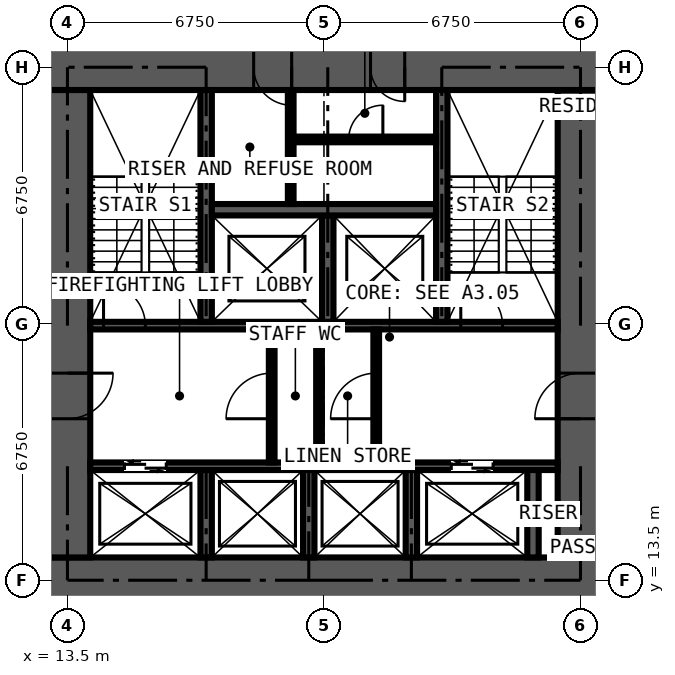
"""IFC4 building model, lengths in metres.
Left out: names, types, materials, properties, quantities, classifications, styles, units other than length and angle.
Written with IfcOpenShell. Run it as: python <this file> out.ifc"""

import sys

from ifc_helpers import new_model, si_unit, direction, frame, frame_2d, origin, place, context, subcontext, project, spatial, rectangle, extrude, element, fill, save


model = new_model("IFC4")
c1 = context("Model", 3, precision=1e-05, world=origin(), true_north=direction((0.0, 1.0)))
c2 = subcontext(c1, "Body", "Model", "MODEL_VIEW")
j1 = project(units=[si_unit("LENGTHUNIT", "METRE"), si_unit("PLANEANGLEUNIT", "RADIAN")], contexts=[c1])
p1 = place(None, origin())
s1 = spatial("IfcSite", under=j1, at=p1, CompositionType="ELEMENT")
p2 = place(p1, origin())
s2 = spatial("IfcBuilding", under=s1, at=p2, CompositionType="ELEMENT")
p3 = place(p2, frame((0.0, 0.0, 101.7)))
s3 = spatial("IfcBuildingStorey", under=s2, at=p3, CompositionType="ELEMENT", Elevation=101.7)
p4 = place(p3, frame((12.9, 13.5, 0.0), z_axis=(0.0, 0.0, 1.0), x_axis=(1.0, 0.0, 0.0)))
e1 = element("IfcWall", 1, at=p4, inside=s3, PredefinedType="SHEAR", context=c2, shape_type="SweptSolid", body=[
    extrude(rectangle(XDim=14.7, YDim=1.2, at=frame_2d((7.35, 0.0))), origin(), (0.0, 0.0, 1.0), 3.6),
])
p5 = place(p3, frame((27.0, 14.1, 0.0), z_axis=(0.0, 0.0, 1.0), x_axis=(0.0, 1.0, 0.0)))
e2 = element("IfcWall", 2, at=p5, inside=s3, PredefinedType="SHEAR", context=c2, shape_type="SweptSolid", body=[
    extrude(rectangle(XDim=12.3, YDim=1.2, at=frame_2d((6.15, 0.0))), origin(), (0.0, 0.0, 1.0), 3.6),
])
p6 = place(p5, frame((3.65, 0.0, 0.0)))
e3 = element("IfcOpeningElement", 3, at=p6, cuts=e2, PredefinedType="OPENING", context=c2, shape_type="SweptSolid", body=[
    extrude(rectangle(XDim=1.2, YDim=2.2, at=frame_2d((0.6, 1.1))), frame((0.0, 0.61, 0.0), z_axis=(0.0, -1.0, 0.0), x_axis=(1.0, 0.0, 0.0)), (0.0, 0.0, 1.0), 1.22),
])
p7 = place(p3, frame((27.6, 27.0, 0.0), z_axis=(0.0, 0.0, 1.0), x_axis=(-1.0, 0.0, 0.0)))
e4 = element("IfcWall", 4, at=p7, inside=s3, PredefinedType="SHEAR", context=c2, shape_type="SweptSolid", body=[
    extrude(rectangle(XDim=14.7, YDim=1.2, at=frame_2d((7.35, 0.0))), origin(), (0.0, 0.0, 1.0), 3.6),
])
p8 = place(p7, frame((5.225, 0.0, 0.0)))
e5 = element("IfcOpeningElement", 5, at=p8, cuts=e4, PredefinedType="OPENING", context=c2, shape_type="SweptSolid", body=[
    extrude(rectangle(XDim=0.9, YDim=2.2, at=frame_2d((0.45, 1.1))), frame((0.0, 0.61, 0.0), z_axis=(0.0, -1.0, 0.0), x_axis=(1.0, 0.0, 0.0)), (0.0, 0.0, 1.0), 1.22),
])
p9 = place(p7, frame((8.2, 0.0, 0.0)))
e6 = element("IfcOpeningElement", 6, at=p9, cuts=e4, PredefinedType="OPENING", context=c2, shape_type="SweptSolid", body=[
    extrude(rectangle(XDim=1.0, YDim=2.2, at=frame_2d((0.5, 1.1))), frame((0.0, 0.61, 0.0), z_axis=(0.0, -1.0, 0.0), x_axis=(1.0, 0.0, 0.0)), (0.0, 0.0, 1.0), 1.22),
])
p10 = place(p3, frame((13.5, 26.4, 0.0), z_axis=(0.0, 0.0, 1.0), x_axis=(0.0, -1.0, 0.0)))
e7 = element("IfcWall", 7, at=p10, inside=s3, PredefinedType="SHEAR", context=c2, shape_type="SweptSolid", body=[
    extrude(rectangle(XDim=12.3, YDim=1.2, at=frame_2d((6.15, 0.0))), origin(), (0.0, 0.0, 1.0), 3.6),
])
p11 = place(p10, frame((7.45, 0.0, 0.0)))
e8 = element("IfcOpeningElement", 8, at=p11, cuts=e7, PredefinedType="OPENING", context=c2, shape_type="SweptSolid", body=[
    extrude(rectangle(XDim=1.2, YDim=2.2, at=frame_2d((0.6, 1.1))), frame((0.0, 0.61, 0.0), z_axis=(0.0, -1.0, 0.0), x_axis=(1.0, 0.0, 0.0)), (0.0, 0.0, 1.0), 1.22),
])
p12 = place(p3, frame((14.1, 16.5, 0.0), z_axis=(0.0, 0.0, 1.0), x_axis=(1.0, 0.0, 0.0)))
e9 = element("IfcWall", 9, at=p12, inside=s3, PredefinedType="SHEAR", context=c2, shape_type="SweptSolid", body=[
    extrude(rectangle(XDim=12.3, YDim=0.2, at=frame_2d((6.15, 0.0))), origin(), (0.0, 0.0, 1.0), 3.6),
])
p13 = place(p12, frame((0.9, 0.0, 0.0)))
e10 = element("IfcOpeningElement", 10, at=p13, cuts=e9, PredefinedType="OPENING", context=c2, shape_type="SweptSolid", body=[
    extrude(rectangle(XDim=1.1, YDim=2.2, at=frame_2d((0.55, 1.1))), frame((0.0, 0.11, 0.0), z_axis=(0.0, -1.0, 0.0), x_axis=(1.0, 0.0, 0.0)), (0.0, 0.0, 1.0), 0.22),
])
p14 = place(p12, frame((9.5, 0.0, 0.0)))
e11 = element("IfcOpeningElement", 11, at=p14, cuts=e9, PredefinedType="OPENING", context=c2, shape_type="SweptSolid", body=[
    extrude(rectangle(XDim=1.1, YDim=2.2, at=frame_2d((0.55, 1.1))), frame((0.0, 0.11, 0.0), z_axis=(0.0, -1.0, 0.0), x_axis=(1.0, 0.0, 0.0)), (0.0, 0.0, 1.0), 0.22),
])
p15 = place(p3, frame((14.1, 20.2, 0.0), z_axis=(0.0, 0.0, 1.0), x_axis=(1.0, 0.0, 0.0)))
e12 = element("IfcWall", 12, at=p15, inside=s3, PredefinedType="SHEAR", context=c2, shape_type="SweptSolid", body=[
    extrude(rectangle(XDim=12.3, YDim=0.2, at=frame_2d((6.15, 0.0))), origin(), (0.0, 0.0, 1.0), 3.6),
])
p16 = place(p15, frame((0.35, 0.0, 0.0)))
e13 = element("IfcOpeningElement", 13, at=p16, cuts=e12, PredefinedType="OPENING", context=c2, shape_type="SweptSolid", body=[
    extrude(rectangle(XDim=1.1, YDim=2.2, at=frame_2d((0.55, 1.1))), frame((0.0, 0.11, 0.0), z_axis=(0.0, -1.0, 0.0), x_axis=(1.0, 0.0, 0.0)), (0.0, 0.0, 1.0), 0.22),
])
p17 = place(p15, frame((9.75, 0.0, 0.0)))
e14 = element("IfcOpeningElement", 14, at=p17, cuts=e12, PredefinedType="OPENING", context=c2, shape_type="SweptSolid", body=[
    extrude(rectangle(XDim=1.1, YDim=2.2, at=frame_2d((0.55, 1.1))), frame((0.0, 0.11, 0.0), z_axis=(0.0, -1.0, 0.0), x_axis=(1.0, 0.0, 0.0)), (0.0, 0.0, 1.0), 0.22),
])
for number, where, z_axis, x_axis in (
    (15, (17.15, 20.3, 0.0), (0.0, 0.0, 1.0), (0.0, 1.0, 0.0)),
    (16, (23.35, 20.3, 0.0), (0.0, 0.0, 1.0), (0.0, 1.0, 0.0)),
):
    element("IfcWall", number, at=place(p3, frame(where, z_axis=z_axis, x_axis=x_axis)), inside=s3, PredefinedType="SHEAR", context=c2, shape_type="SweptSolid", body=[
        extrude(rectangle(XDim=6.1, YDim=0.3, at=frame_2d((3.05, 0.0))), origin(), (0.0, 0.0, 1.0), 3.6),
    ])
p18 = place(p3, frame((20.35, 20.3, 0.0), z_axis=(0.0, 0.0, 1.0), x_axis=(0.0, 1.0, 0.0)))
e17 = element("IfcWall", 17, at=p18, inside=s3, PredefinedType="SHEAR", context=c2, shape_type="SweptSolid", body=[
    extrude(rectangle(XDim=2.8, YDim=0.3, at=frame_2d((1.4, 0.0))), origin(), (0.0, 0.0, 1.0), 3.6),
])
p19 = place(p3, frame((17.3, 23.25, 0.0), z_axis=(0.0, 0.0, 1.0), x_axis=(1.0, 0.0, 0.0)))
e18 = element("IfcWall", 18, at=p19, inside=s3, PredefinedType="SHEAR", context=c2, shape_type="SweptSolid", body=[
    extrude(rectangle(XDim=5.9, YDim=0.3, at=frame_2d((2.95, 0.0))), origin(), (0.0, 0.0, 1.0), 3.6),
])
for number, where, z_axis, x_axis in (
    (19, (17.15, 14.1, 0.0), (0.0, 0.0, 1.0), (0.0, 1.0, 0.0)),
    (20, (19.85, 14.1, 0.0), (0.0, 0.0, 1.0), (0.0, 1.0, 0.0)),
    (21, (22.55, 14.1, 0.0), (0.0, 0.0, 1.0), (0.0, 1.0, 0.0)),
    (22, (25.75, 14.1, 0.0), (0.0, 0.0, 1.0), (0.0, 1.0, 0.0)),
):
    element("IfcWall", number, at=place(p3, frame(where, z_axis=z_axis, x_axis=x_axis)), inside=s3, PredefinedType="SHEAR", context=c2, shape_type="SweptSolid", body=[
        extrude(rectangle(XDim=2.3, YDim=0.3, at=frame_2d((1.15, 0.0))), origin(), (0.0, 0.0, 1.0), 3.6),
    ])
p20 = place(p3, frame((18.875, 16.6, 0.0), z_axis=(0.0, 0.0, 1.0), x_axis=(0.0, 1.0, 0.0)))
e23 = element("IfcWall", 23, at=p20, inside=s3, PredefinedType="PARTITIONING", context=c2, shape_type="SweptSolid", body=[
    extrude(rectangle(XDim=3.5, YDim=0.15, at=frame_2d((1.75, 0.0))), origin(), (0.0, 0.0, 1.0), 3.375),
])
p21 = place(p20, frame((1.15, 0.0, 0.0)))
e24 = element("IfcOpeningElement", 24, at=p21, cuts=e23, PredefinedType="OPENING", context=c2, shape_type="SweptSolid", body=[
    extrude(rectangle(XDim=1.2, YDim=2.2, at=frame_2d((0.6, 1.1))), frame((0.0, 0.085, 0.0), z_axis=(0.0, -1.0, 0.0), x_axis=(1.0, 0.0, 0.0)), (0.0, 0.0, 1.0), 0.17),
])
p22 = place(p3, frame((21.625, 16.6, 0.0), z_axis=(0.0, 0.0, 1.0), x_axis=(0.0, 1.0, 0.0)))
e25 = element("IfcWall", 25, at=p22, inside=s3, PredefinedType="PARTITIONING", context=c2, shape_type="SweptSolid", body=[
    extrude(rectangle(XDim=3.5, YDim=0.15, at=frame_2d((1.75, 0.0))), origin(), (0.0, 0.0, 1.0), 3.375),
])
p23 = place(p22, frame((1.15, 0.0, 0.0)))
e26 = element("IfcOpeningElement", 26, at=p23, cuts=e25, PredefinedType="OPENING", context=c2, shape_type="SweptSolid", body=[
    extrude(rectangle(XDim=1.2, YDim=2.2, at=frame_2d((0.6, 1.1))), frame((0.0, 0.085, 0.0), z_axis=(0.0, -1.0, 0.0), x_axis=(1.0, 0.0, 0.0)), (0.0, 0.0, 1.0), 0.17),
])
p24 = place(p3, frame((20.12, 16.6, 0.0), z_axis=(0.0, 0.0, 1.0), x_axis=(0.0, 1.0, 0.0)))
e27 = element("IfcWall", 27, at=p24, inside=s3, PredefinedType="PARTITIONING", context=c2, shape_type="SweptSolid", body=[
    extrude(rectangle(XDim=3.5, YDim=0.15, at=frame_2d((1.75, 0.0))), origin(), (0.0, 0.0, 1.0), 3.375),
])
p25 = place(p3, frame((19.375, 23.4, 0.0), z_axis=(0.0, 0.0, 1.0), x_axis=(0.0, 1.0, 0.0)))
e28 = element("IfcWall", 28, at=p25, inside=s3, PredefinedType="PARTITIONING", context=c2, shape_type="SweptSolid", body=[
    extrude(rectangle(XDim=3.0, YDim=0.15, at=frame_2d((1.5, 0.0))), origin(), (0.0, 0.0, 1.0), 3.375),
])
p26 = place(p3, frame((19.45, 25.1, 0.0), z_axis=(0.0, 0.0, 1.0), x_axis=(1.0, 0.0, 0.0)))
e29 = element("IfcWall", 29, at=p26, inside=s3, PredefinedType="PARTITIONING", context=c2, shape_type="SweptSolid", body=[
    extrude(rectangle(XDim=3.75, YDim=0.15, at=frame_2d((1.875, 0.0))), origin(), (0.0, 0.0, 1.0), 3.375),
])
p27 = place(p26, frame((1.45, 0.0, 0.0)))
e30 = element("IfcOpeningElement", 30, at=p27, cuts=e29, PredefinedType="OPENING", context=c2, shape_type="SweptSolid", body=[
    extrude(rectangle(XDim=0.9, YDim=2.2, at=frame_2d((0.45, 1.1))), frame((0.0, 0.085, 0.0), z_axis=(0.0, -1.0, 0.0), x_axis=(1.0, 0.0, 0.0)), (0.0, 0.0, 1.0), 0.17),
])
p28 = place(p13, origin())
e31 = element("IfcDoor", 31, at=p28, inside=s3, OperationType="DOUBLE_DOOR_SLIDING", PredefinedType="DOOR", context=c2, shape_type="SweptSolid", body=[
    extrude(rectangle(XDim=1.1, YDim=2.2, at=frame_2d((0.55, 1.1))), frame((0.0, 0.025, 0.0), z_axis=(0.0, -1.0, 0.0), x_axis=(1.0, 0.0, 0.0)), (0.0, 0.0, 1.0), 0.05),
])
fill(e10, e31)
p29 = place(p14, origin())
e32 = element("IfcDoor", 32, at=p29, inside=s3, OperationType="DOUBLE_DOOR_SLIDING", PredefinedType="DOOR", context=c2, shape_type="SweptSolid", body=[
    extrude(rectangle(XDim=1.1, YDim=2.2, at=frame_2d((0.55, 1.1))), frame((0.0, 0.025, 0.0), z_axis=(0.0, -1.0, 0.0), x_axis=(1.0, 0.0, 0.0)), (0.0, 0.0, 1.0), 0.05),
])
fill(e11, e32)
p30 = place(p11, origin())
e33 = element("IfcDoor", 33, at=p30, inside=s3, OperationType="DOUBLE_DOOR_SINGLE_SWING", PredefinedType="DOOR", context=c2, shape_type="SweptSolid", body=[
    extrude(rectangle(XDim=1.2, YDim=2.2, at=frame_2d((0.6, 1.1))), frame((0.0, 0.025, 0.0), z_axis=(0.0, -1.0, 0.0), x_axis=(1.0, 0.0, 0.0)), (0.0, 0.0, 1.0), 0.05),
])
fill(e8, e33)
p31 = place(p6, origin())
e34 = element("IfcDoor", 34, at=p31, inside=s3, OperationType="DOUBLE_DOOR_SINGLE_SWING", PredefinedType="DOOR", context=c2, shape_type="SweptSolid", body=[
    extrude(rectangle(XDim=1.2, YDim=2.2, at=frame_2d((0.6, 1.1))), frame((0.0, 0.025, 0.0), z_axis=(0.0, -1.0, 0.0), x_axis=(1.0, 0.0, 0.0)), (0.0, 0.0, 1.0), 0.05),
])
fill(e3, e34)
p32 = place(p21, origin())
e35 = element("IfcDoor", 35, at=p32, inside=s3, OperationType="DOUBLE_DOOR_SINGLE_SWING", PredefinedType="DOOR", context=c2, shape_type="SweptSolid", body=[
    extrude(rectangle(XDim=1.2, YDim=2.2, at=frame_2d((0.6, 1.1))), frame((0.0, 0.025, 0.0), z_axis=(0.0, -1.0, 0.0), x_axis=(1.0, 0.0, 0.0)), (0.0, 0.0, 1.0), 0.05),
])
fill(e24, e35)
p33 = place(p23, origin())
e36 = element("IfcDoor", 36, at=p33, inside=s3, OperationType="DOUBLE_DOOR_SINGLE_SWING", PredefinedType="DOOR", context=c2, shape_type="SweptSolid", body=[
    extrude(rectangle(XDim=1.2, YDim=2.2, at=frame_2d((0.6, 1.1))), frame((0.0, 0.025, 0.0), z_axis=(0.0, -1.0, 0.0), x_axis=(1.0, 0.0, 0.0)), (0.0, 0.0, 1.0), 0.05),
])
fill(e26, e36)
p34 = place(p27, origin())
e37 = element("IfcDoor", 37, at=p34, inside=s3, OperationType="SINGLE_SWING_RIGHT", PredefinedType="DOOR", context=c2, shape_type="SweptSolid", body=[
    extrude(rectangle(XDim=0.9, YDim=2.2, at=frame_2d((0.45, 1.1))), frame((0.0, 0.025, 0.0), z_axis=(0.0, -1.0, 0.0), x_axis=(1.0, 0.0, 0.0)), (0.0, 0.0, 1.0), 0.05),
])
fill(e30, e37)
p35 = place(p8, origin())
e38 = element("IfcDoor", 38, at=p35, inside=s3, OperationType="SINGLE_SWING_LEFT", PredefinedType="DOOR", context=c2, shape_type="SweptSolid", body=[
    extrude(rectangle(XDim=0.9, YDim=2.2, at=frame_2d((0.45, 1.1))), frame((0.0, 0.4, 0.0), z_axis=(0.0, -1.0, 0.0), x_axis=(1.0, 0.0, 0.0)), (0.0, 0.0, 1.0), 0.8),
])
fill(e5, e38)
p36 = place(p9, origin())
e39 = element("IfcDoor", 39, at=p36, inside=s3, OperationType="SINGLE_SWING_LEFT", PredefinedType="DOOR", context=c2, shape_type="SweptSolid", body=[
    extrude(rectangle(XDim=1.0, YDim=2.2, at=frame_2d((0.5, 1.1))), frame((0.0, 0.025, 0.0), z_axis=(0.0, -1.0, 0.0), x_axis=(1.0, 0.0, 0.0)), (0.0, 0.0, 1.0), 0.05),
])
fill(e6, e39)
p37 = place(p16, origin())
e40 = element("IfcDoor", 40, at=p37, inside=s3, OperationType="SINGLE_SWING_LEFT", PredefinedType="DOOR", context=c2, shape_type="SweptSolid", body=[
    extrude(rectangle(XDim=1.1, YDim=2.2, at=frame_2d((0.55, 1.1))), frame((0.0, 0.025, 0.0), z_axis=(0.0, -1.0, 0.0), x_axis=(1.0, 0.0, 0.0)), (0.0, 0.0, 1.0), 0.05),
])
fill(e13, e40)
p38 = place(p17, origin())
e41 = element("IfcDoor", 41, at=p38, inside=s3, OperationType="SINGLE_SWING_LEFT", PredefinedType="DOOR", context=c2, shape_type="SweptSolid", body=[
    extrude(rectangle(XDim=1.1, YDim=2.2, at=frame_2d((0.55, 1.1))), frame((0.0, 0.025, 0.0), z_axis=(0.0, -1.0, 0.0), x_axis=(1.0, 0.0, 0.0)), (0.0, 0.0, 1.0), 0.05),
])
fill(e14, e41)
save(model, sys.argv[1])
